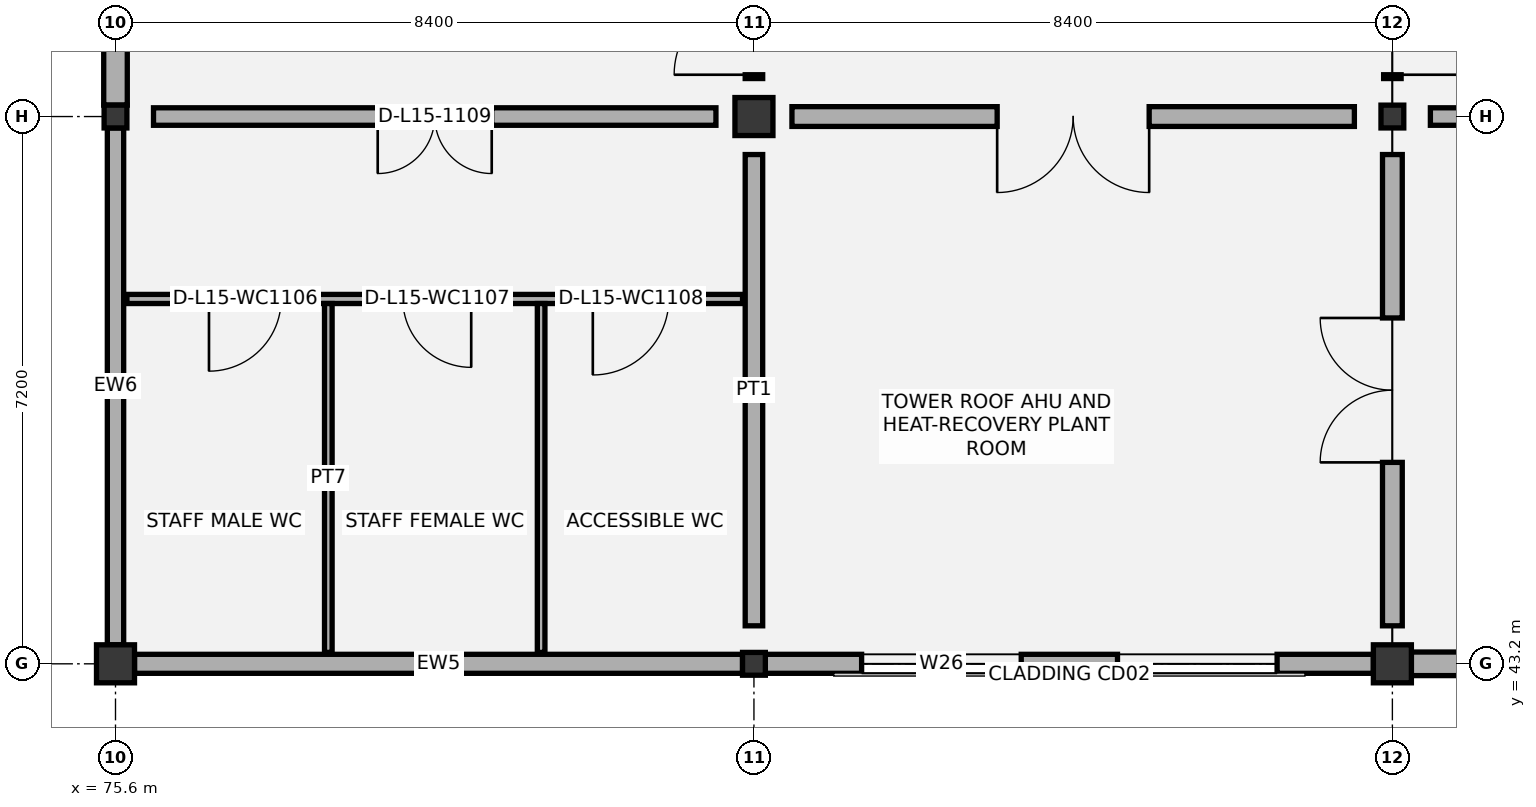
"""IFC4 building model, lengths in metres.
Left out: names, types, materials, properties, quantities, classifications, styles, units other than length and angle.
Written with IfcOpenShell. Run it as: python <this file> out.ifc"""

import sys

from ifc_helpers import new_model, si_unit, direction, frame, frame_2d, origin, origin_2d, place, context, subcontext, project, spatial, rectangle, i_section, extrude, element, fill, save


model = new_model("IFC4")
c1 = context("Model", 3, precision=1e-05, world=origin(), true_north=direction((0.0, 1.0)))
c2 = subcontext(c1, "Body", "Model", "MODEL_VIEW")
j1 = project(units=[si_unit("LENGTHUNIT", "METRE"), si_unit("PLANEANGLEUNIT", "RADIAN")], contexts=[c1])
p1 = place(None, origin())
s1 = spatial("IfcSite", under=j1, at=p1, CompositionType="ELEMENT")
p2 = place(p1, origin())
s2 = spatial("IfcBuilding", under=s1, at=p2, CompositionType="ELEMENT")
p3 = place(p2, frame((0.0, 0.0, 69.0)))
s3 = spatial("IfcBuildingStorey", under=s2, at=p3, CompositionType="ELEMENT", Elevation=69.0)
p4 = place(p3, frame((75.6, 43.2, 0.0), z_axis=(0.0, 0.0, 1.0), x_axis=(1.0, 0.0, 0.0)))
e1 = element("IfcColumn", 1, at=p4, inside=s3, PredefinedType="COLUMN", context=c2, shape_type="SweptSolid", body=[
    extrude(rectangle(XDim=0.5, YDim=0.5, at=origin_2d()), origin(), (0.0, 0.0, 1.0), 4.8),
])
for number, where, z_axis, x_axis in (
    (2, (75.6, 50.4, 0.0), (0.0, 0.0, 1.0), (1.0, 0.0, 0.0)),
    (3, (84.0, 43.2, 0.0), (0.0, 0.0, 1.0), (1.0, 0.0, 0.0)),
):
    element("IfcColumn", number, at=place(p3, frame(where, z_axis=z_axis, x_axis=x_axis)), inside=s3, PredefinedType="COLUMN", context=c2, shape_type="SweptSolid", body=[
        extrude(i_section(OverallWidth=0.3, OverallDepth=0.3, WebThickness=0.011, FlangeThickness=0.019, FilletRadius=0.027, at=origin_2d()), origin(), (0.0, 0.0, 1.0), 4.8),
    ])
for number, where, z_axis, x_axis in (
    (4, (84.0, 50.4, 0.0), (0.0, 0.0, 1.0), (1.0, 0.0, 0.0)),
    (5, (92.4, 43.2, 0.0), (0.0, 0.0, 1.0), (1.0, 0.0, 0.0)),
):
    element("IfcColumn", number, at=place(p3, frame(where, z_axis=z_axis, x_axis=x_axis)), inside=s3, PredefinedType="COLUMN", context=c2, shape_type="SweptSolid", body=[
        extrude(rectangle(XDim=0.5, YDim=0.5, at=origin_2d()), origin(), (0.0, 0.0, 1.0), 4.8),
    ])
p5 = place(p3, frame((92.4, 50.4, 0.0), z_axis=(0.0, 0.0, 1.0), x_axis=(1.0, 0.0, 0.0)))
e6 = element("IfcColumn", 6, at=p5, inside=s3, PredefinedType="COLUMN", context=c2, shape_type="SweptSolid", body=[
    extrude(i_section(OverallWidth=0.3, OverallDepth=0.3, WebThickness=0.011, FlangeThickness=0.019, FilletRadius=0.027, at=origin_2d()), origin(), (0.0, 0.0, 1.0), 4.8),
])
p6 = place(p3, frame((75.85, 43.2, 0.0), z_axis=(0.0, 0.0, 1.0), x_axis=(1.0, 0.0, 0.0)))
e7 = element("IfcWall", 7, at=p6, inside=s3, PredefinedType="SOLIDWALL", context=c2, shape_type="SweptSolid", body=[
    extrude(rectangle(XDim=8.0, YDim=0.25, at=frame_2d((4.0, 0.0))), origin(), (0.0, 0.0, 1.0), 4.365),
])
p7 = place(p3, frame((75.6, 43.45, 0.0), z_axis=(0.0, 0.0, 1.0), x_axis=(0.0, 1.0, 0.0)))
e8 = element("IfcWall", 8, at=p7, inside=s3, PredefinedType="SOLIDWALL", context=c2, shape_type="SweptSolid", body=[
    extrude(rectangle(XDim=6.8, YDim=0.215, at=frame_2d((3.4, 0.0))), origin(), (0.0, 0.0, 1.0), 4.045),
])
p8 = place(p3, frame((75.6, 50.55, 0.0), z_axis=(0.0, 0.0, 1.0), x_axis=(0.0, 1.0, 0.0)))
e9 = element("IfcWall", 9, at=p8, inside=s3, PredefinedType="SOLIDWALL", context=c2, shape_type="SweptSolid", body=[
    extrude(rectangle(XDim=6.8, YDim=0.31, at=frame_2d((3.4, 0.0))), origin(), (0.0, 0.0, 1.0), 4.045),
])
p9 = place(p3, frame((84.15, 43.2, 0.0), z_axis=(0.0, 0.0, 1.0), x_axis=(1.0, 0.0, 0.0)))
e10 = element("IfcWall", 10, at=p9, inside=s3, PredefinedType="SOLIDWALL", context=c2, shape_type="SweptSolid", body=[
    extrude(rectangle(XDim=8.0, YDim=0.25, at=frame_2d((4.0, 0.0))), origin(), (0.0, 0.0, 1.0), 4.365),
])
p10 = place(p9, frame((1.267, 0.0, 1.45)))
e11 = element("IfcOpeningElement", 11, at=p10, cuts=e10, PredefinedType="OPENING", context=c2, shape_type="SweptSolid", body=[
    extrude(rectangle(XDim=2.1, YDim=1.35, at=frame_2d((1.05, 0.675))), frame((0.0, 0.135, 0.0), z_axis=(0.0, -1.0, 0.0), x_axis=(1.0, 0.0, 0.0)), (0.0, 0.0, 1.0), 0.27),
])
p11 = place(p9, frame((4.633, 0.0, 1.45)))
e12 = element("IfcOpeningElement", 12, at=p11, cuts=e10, PredefinedType="OPENING", context=c2, shape_type="SweptSolid", body=[
    extrude(rectangle(XDim=2.1, YDim=1.35, at=frame_2d((1.05, 0.675))), frame((0.0, 0.135, 0.0), z_axis=(0.0, -1.0, 0.0), x_axis=(1.0, 0.0, 0.0)), (0.0, 0.0, 1.0), 0.27),
])
p12 = place(p3, frame((92.65, 43.2, 0.0), z_axis=(0.0, 0.0, 1.0), x_axis=(1.0, 0.0, 0.0)))
e13 = element("IfcWall", 13, at=p12, inside=s3, PredefinedType="SOLIDWALL", context=c2, shape_type="SweptSolid", body=[
    extrude(rectangle(XDim=8.0, YDim=0.31, at=frame_2d((4.0, 0.0))), origin(), (0.0, 0.0, 1.0), 4.365),
])
p13 = place(p12, frame((1.267, 0.0, 1.45)))
e14 = element("IfcOpeningElement", 14, at=p13, cuts=e13, PredefinedType="OPENING", context=c2, shape_type="SweptSolid", body=[
    extrude(rectangle(XDim=2.1, YDim=1.35, at=frame_2d((1.05, 0.675))), frame((0.0, 0.165, 0.0), z_axis=(0.0, -1.0, 0.0), x_axis=(1.0, 0.0, 0.0)), (0.0, 0.0, 1.0), 0.33),
])
p14 = place(p12, frame((4.633, 0.0, 1.45)))
e15 = element("IfcOpeningElement", 15, at=p14, cuts=e13, PredefinedType="OPENING", context=c2, shape_type="SweptSolid", body=[
    extrude(rectangle(XDim=2.1, YDim=1.35, at=frame_2d((1.05, 0.675))), frame((0.0, 0.165, 0.0), z_axis=(0.0, -1.0, 0.0), x_axis=(1.0, 0.0, 0.0)), (0.0, 0.0, 1.0), 0.33),
])
p15 = place(p3, frame((75.75, 48.0, 0.0), z_axis=(0.0, 0.0, 1.0), x_axis=(1.0, 0.0, 0.0)))
e16 = element("IfcWall", 16, at=p15, inside=s3, PredefinedType="PARTITIONING", context=c2, shape_type="SweptSolid", body=[
    extrude(rectangle(XDim=8.1, YDim=0.12, at=frame_2d((4.05, 0.0))), origin(), (0.0, 0.0, 1.0), 4.6),
])
p16 = place(p15, frame((1.08, 0.0, 0.0)))
e17 = element("IfcOpeningElement", 17, at=p16, cuts=e16, PredefinedType="OPENING", context=c2, shape_type="SweptSolid", body=[
    extrude(rectangle(XDim=0.95, YDim=2.1, at=frame_2d((0.475, 1.05))), frame((0.0, 0.07, 0.0), z_axis=(0.0, -1.0, 0.0), x_axis=(1.0, 0.0, 0.0)), (0.0, 0.0, 1.0), 0.14),
])
p17 = place(p15, frame((3.63, 0.0, 0.0)))
e18 = element("IfcOpeningElement", 18, at=p17, cuts=e16, PredefinedType="OPENING", context=c2, shape_type="SweptSolid", body=[
    extrude(rectangle(XDim=0.9, YDim=2.1, at=frame_2d((0.45, 1.05))), frame((0.0, 0.07, 0.0), z_axis=(0.0, -1.0, 0.0), x_axis=(1.0, 0.0, 0.0)), (0.0, 0.0, 1.0), 0.14),
])
p18 = place(p15, frame((6.13, 0.0, 0.0)))
e19 = element("IfcOpeningElement", 19, at=p18, cuts=e16, PredefinedType="OPENING", context=c2, shape_type="SweptSolid", body=[
    extrude(rectangle(XDim=1.0, YDim=2.1, at=frame_2d((0.5, 1.05))), frame((0.0, 0.07, 0.0), z_axis=(0.0, -1.0, 0.0), x_axis=(1.0, 0.0, 0.0)), (0.0, 0.0, 1.0), 0.14),
])
for number, where, z_axis, x_axis in (
    (20, (78.4, 43.35, 0.0), (0.0, 0.0, 1.0), (0.0, 1.0, 0.0)),
    (21, (81.2, 43.35, 0.0), (0.0, 0.0, 1.0), (0.0, 1.0, 0.0)),
):
    element("IfcWall", number, at=place(p3, frame(where, z_axis=z_axis, x_axis=x_axis)), inside=s3, PredefinedType="PARTITIONING", context=c2, shape_type="SweptSolid", body=[
        extrude(rectangle(XDim=4.59, YDim=0.1, at=frame_2d((2.295, 0.0))), origin(), (0.0, 0.0, 1.0), 4.6),
    ])
p19 = place(p3, frame((84.0, 43.7, 0.0), z_axis=(0.0, 0.0, 1.0), x_axis=(0.0, 1.0, 0.0)))
e22 = element("IfcWall", 22, at=p19, inside=s3, PredefinedType="PARTITIONING", context=c2, shape_type="SweptSolid", body=[
    extrude(rectangle(XDim=6.2, YDim=0.23, at=frame_2d((3.1, 0.0))), origin(), (0.0, 0.0, 1.0), 4.095),
])
p20 = place(p3, frame((76.1, 50.4, 0.0), z_axis=(0.0, 0.0, 1.0), x_axis=(1.0, 0.0, 0.0)))
e23 = element("IfcWall", 23, at=p20, inside=s3, PredefinedType="PARTITIONING", context=c2, shape_type="SweptSolid", body=[
    extrude(rectangle(XDim=7.4, YDim=0.23, at=frame_2d((3.7, 0.0))), origin(), (0.0, 0.0, 1.0), 4.305),
])
p21 = place(p20, frame((2.95, 0.0, 0.0)))
e24 = element("IfcOpeningElement", 24, at=p21, cuts=e23, PredefinedType="OPENING", context=c2, shape_type="SweptSolid", body=[
    extrude(rectangle(XDim=1.5, YDim=2.15, at=frame_2d((0.75, 1.075))), frame((0.0, 0.125, 0.0), z_axis=(0.0, -1.0, 0.0), x_axis=(1.0, 0.0, 0.0)), (0.0, 0.0, 1.0), 0.25),
])
p22 = place(p3, frame((84.0, 50.9, 0.0), z_axis=(0.0, 0.0, 1.0), x_axis=(0.0, 1.0, 0.0)))
e25 = element("IfcWall", 25, at=p22, inside=s3, PredefinedType="PARTITIONING", context=c2, shape_type="SweptSolid", body=[
    extrude(rectangle(XDim=6.2, YDim=0.23, at=frame_2d((3.1, 0.0))), origin(), (0.0, 0.0, 1.0), 4.305),
])
p23 = place(p22, frame((0.05, 0.0, 0.0)))
e26 = element("IfcOpeningElement", 26, at=p23, cuts=e25, PredefinedType="OPENING", context=c2, shape_type="SweptSolid", body=[
    extrude(rectangle(XDim=1.05, YDim=2.15, at=frame_2d((0.525, 1.075))), frame((0.0, 0.125, 0.0), z_axis=(0.0, -1.0, 0.0), x_axis=(1.0, 0.0, 0.0)), (0.0, 0.0, 1.0), 0.25),
])
p24 = place(p3, frame((92.4, 43.7, 0.0), z_axis=(0.0, 0.0, 1.0), x_axis=(0.0, 1.0, 0.0)))
e27 = element("IfcWall", 27, at=p24, inside=s3, PredefinedType="PARTITIONING", context=c2, shape_type="SweptSolid", body=[
    extrude(rectangle(XDim=6.2, YDim=0.26, at=frame_2d((3.1, 0.0))), origin(), (0.0, 0.0, 1.0), 4.305),
])
p25 = place(p24, frame((2.15, 0.0, 0.0)))
e28 = element("IfcOpeningElement", 28, at=p25, cuts=e27, PredefinedType="OPENING", context=c2, shape_type="SweptSolid", body=[
    extrude(rectangle(XDim=1.9, YDim=2.3, at=frame_2d((0.95, 1.15))), frame((0.0, 0.14, 0.0), z_axis=(0.0, -1.0, 0.0), x_axis=(1.0, 0.0, 0.0)), (0.0, 0.0, 1.0), 0.28),
])
p26 = place(p3, frame((84.5, 50.4, 0.0), z_axis=(0.0, 0.0, 1.0), x_axis=(1.0, 0.0, 0.0)))
e29 = element("IfcWall", 29, at=p26, inside=s3, PredefinedType="PARTITIONING", context=c2, shape_type="SweptSolid", body=[
    extrude(rectangle(XDim=7.4, YDim=0.26, at=frame_2d((3.7, 0.0))), origin(), (0.0, 0.0, 1.0), 4.325),
])
p27 = place(p26, frame((2.7, 0.0, 0.0)))
e30 = element("IfcOpeningElement", 30, at=p27, cuts=e29, PredefinedType="OPENING", context=c2, shape_type="SweptSolid", body=[
    extrude(rectangle(XDim=2.0, YDim=2.35, at=frame_2d((1.0, 1.175))), frame((0.0, 0.14, 0.0), z_axis=(0.0, -1.0, 0.0), x_axis=(1.0, 0.0, 0.0)), (0.0, 0.0, 1.0), 0.28),
])
p28 = place(p3, frame((92.4, 50.9, 0.0), z_axis=(0.0, 0.0, 1.0), x_axis=(0.0, 1.0, 0.0)))
e31 = element("IfcWall", 31, at=p28, inside=s3, PredefinedType="PARTITIONING", context=c2, shape_type="SweptSolid", body=[
    extrude(rectangle(XDim=6.2, YDim=0.23, at=frame_2d((3.1, 0.0))), origin(), (0.0, 0.0, 1.0), 4.095),
])
p29 = place(p28, frame((0.05, 0.0, 0.0)))
e32 = element("IfcOpeningElement", 32, at=p29, cuts=e31, PredefinedType="OPENING", context=c2, shape_type="SweptSolid", body=[
    extrude(rectangle(XDim=1.05, YDim=2.15, at=frame_2d((0.525, 1.075))), frame((0.0, 0.125, 0.0), z_axis=(0.0, -1.0, 0.0), x_axis=(1.0, 0.0, 0.0)), (0.0, 0.0, 1.0), 0.25),
])
p30 = place(p3, frame((92.9, 50.4, 0.0), z_axis=(0.0, 0.0, 1.0), x_axis=(1.0, 0.0, 0.0)))
e33 = element("IfcWall", 33, at=p30, inside=s3, PredefinedType="PARTITIONING", context=c2, shape_type="SweptSolid", body=[
    extrude(rectangle(XDim=7.4, YDim=0.23, at=frame_2d((3.7, 0.0))), origin(), (0.0, 0.0, 1.0), 3.995),
])
p31 = place(p30, frame((2.95, 0.0, 0.0)))
e34 = element("IfcOpeningElement", 34, at=p31, cuts=e33, PredefinedType="OPENING", context=c2, shape_type="SweptSolid", body=[
    extrude(rectangle(XDim=1.5, YDim=2.15, at=frame_2d((0.75, 1.075))), frame((0.0, 0.125, 0.0), z_axis=(0.0, -1.0, 0.0), x_axis=(1.0, 0.0, 0.0)), (0.0, 0.0, 1.0), 0.25),
])
p32 = place(p10, origin())
e35 = element("IfcWindow", 35, at=p32, inside=s3, PartitioningType="SINGLE_PANEL", PredefinedType="WINDOW", context=c2, shape_type="SweptSolid", body=[
    extrude(rectangle(XDim=2.1, YDim=1.35, at=frame_2d((1.05, 0.675))), frame((0.0, 0.03, 0.0), z_axis=(0.0, -1.0, 0.0), x_axis=(1.0, 0.0, 0.0)), (0.0, 0.0, 1.0), 0.06),
])
fill(e11, e35)
p33 = place(p11, origin())
e36 = element("IfcWindow", 36, at=p33, inside=s3, PartitioningType="SINGLE_PANEL", PredefinedType="WINDOW", context=c2, shape_type="SweptSolid", body=[
    extrude(rectangle(XDim=2.1, YDim=1.35, at=frame_2d((1.05, 0.675))), frame((0.0, 0.03, 0.0), z_axis=(0.0, -1.0, 0.0), x_axis=(1.0, 0.0, 0.0)), (0.0, 0.0, 1.0), 0.06),
])
fill(e12, e36)
p34 = place(p16, frame((0.95, 0.0, 0.0), z_axis=(0.0, 0.0, 1.0), x_axis=(-1.0, 0.0, 0.0)))
e37 = element("IfcDoor", 37, at=p34, inside=s3, OperationType="SINGLE_SWING_RIGHT", PredefinedType="DOOR", context=c2, shape_type="SweptSolid", body=[
    extrude(rectangle(XDim=0.95, YDim=2.1, at=frame_2d((0.475, 1.05))), frame((0.0, 0.025, 0.0), z_axis=(0.0, -1.0, 0.0), x_axis=(1.0, 0.0, 0.0)), (0.0, 0.0, 1.0), 0.05),
])
fill(e17, e37)
p35 = place(p17, frame((0.9, 0.0, 0.0), z_axis=(0.0, 0.0, 1.0), x_axis=(-1.0, 0.0, 0.0)))
e38 = element("IfcDoor", 38, at=p35, inside=s3, OperationType="SINGLE_SWING_LEFT", PredefinedType="DOOR", context=c2, shape_type="SweptSolid", body=[
    extrude(rectangle(XDim=0.9, YDim=2.1, at=frame_2d((0.45, 1.05))), frame((0.0, 0.025, 0.0), z_axis=(0.0, -1.0, 0.0), x_axis=(1.0, 0.0, 0.0)), (0.0, 0.0, 1.0), 0.05),
])
fill(e18, e38)
p36 = place(p18, frame((1.0, 0.0, 0.0), z_axis=(0.0, 0.0, 1.0), x_axis=(-1.0, 0.0, 0.0)))
e39 = element("IfcDoor", 39, at=p36, inside=s3, OperationType="SINGLE_SWING_RIGHT", PredefinedType="DOOR", context=c2, shape_type="SweptSolid", body=[
    extrude(rectangle(XDim=1.0, YDim=2.1, at=frame_2d((0.5, 1.05))), frame((0.0, 0.025, 0.0), z_axis=(0.0, -1.0, 0.0), x_axis=(1.0, 0.0, 0.0)), (0.0, 0.0, 1.0), 0.05),
])
fill(e19, e39)
p37 = place(p21, frame((1.5, 0.0, 0.0), z_axis=(0.0, 0.0, 1.0), x_axis=(-1.0, 0.0, 0.0)))
e40 = element("IfcDoor", 40, at=p37, inside=s3, OperationType="DOUBLE_DOOR_SINGLE_SWING", PredefinedType="DOOR", context=c2, shape_type="SweptSolid", body=[
    extrude(rectangle(XDim=1.5, YDim=2.15, at=frame_2d((0.75, 1.075))), frame((0.0, 0.025, 0.0), z_axis=(0.0, -1.0, 0.0), x_axis=(1.0, 0.0, 0.0)), (0.0, 0.0, 1.0), 0.05),
])
fill(e24, e40)
p38 = place(p23, origin())
e41 = element("IfcDoor", 41, at=p38, inside=s3, OperationType="SINGLE_SWING_LEFT", PredefinedType="DOOR", context=c2, shape_type="SweptSolid", body=[
    extrude(rectangle(XDim=1.05, YDim=2.15, at=frame_2d((0.525, 1.075))), frame((0.0, 0.025, 0.0), z_axis=(0.0, -1.0, 0.0), x_axis=(1.0, 0.0, 0.0)), (0.0, 0.0, 1.0), 0.05),
])
fill(e26, e41)
p39 = place(p25, origin())
e42 = element("IfcDoor", 42, at=p39, inside=s3, OperationType="DOUBLE_DOOR_SINGLE_SWING", PredefinedType="DOOR", context=c2, shape_type="SweptSolid", body=[
    extrude(rectangle(XDim=1.9, YDim=2.3, at=frame_2d((0.95, 1.15))), frame((0.0, 0.025, 0.0), z_axis=(0.0, -1.0, 0.0), x_axis=(1.0, 0.0, 0.0)), (0.0, 0.0, 1.0), 0.05),
])
fill(e28, e42)
p40 = place(p27, frame((2.0, 0.0, 0.0), z_axis=(0.0, 0.0, 1.0), x_axis=(-1.0, 0.0, 0.0)))
e43 = element("IfcDoor", 43, at=p40, inside=s3, OperationType="DOUBLE_DOOR_SINGLE_SWING", PredefinedType="DOOR", context=c2, shape_type="SweptSolid", body=[
    extrude(rectangle(XDim=2.0, YDim=2.35, at=frame_2d((1.0, 1.175))), frame((0.0, 0.025, 0.0), z_axis=(0.0, -1.0, 0.0), x_axis=(1.0, 0.0, 0.0)), (0.0, 0.0, 1.0), 0.05),
])
fill(e30, e43)
p41 = place(p29, frame((1.05, 0.0, 0.0), z_axis=(0.0, 0.0, 1.0), x_axis=(-1.0, 0.0, 0.0)))
e44 = element("IfcDoor", 44, at=p41, inside=s3, OperationType="SINGLE_SWING_RIGHT", PredefinedType="DOOR", context=c2, shape_type="SweptSolid", body=[
    extrude(rectangle(XDim=1.05, YDim=2.15, at=frame_2d((0.525, 1.075))), frame((0.0, 0.025, 0.0), z_axis=(0.0, -1.0, 0.0), x_axis=(1.0, 0.0, 0.0)), (0.0, 0.0, 1.0), 0.05),
])
fill(e32, e44)
save(model, sys.argv[1])
